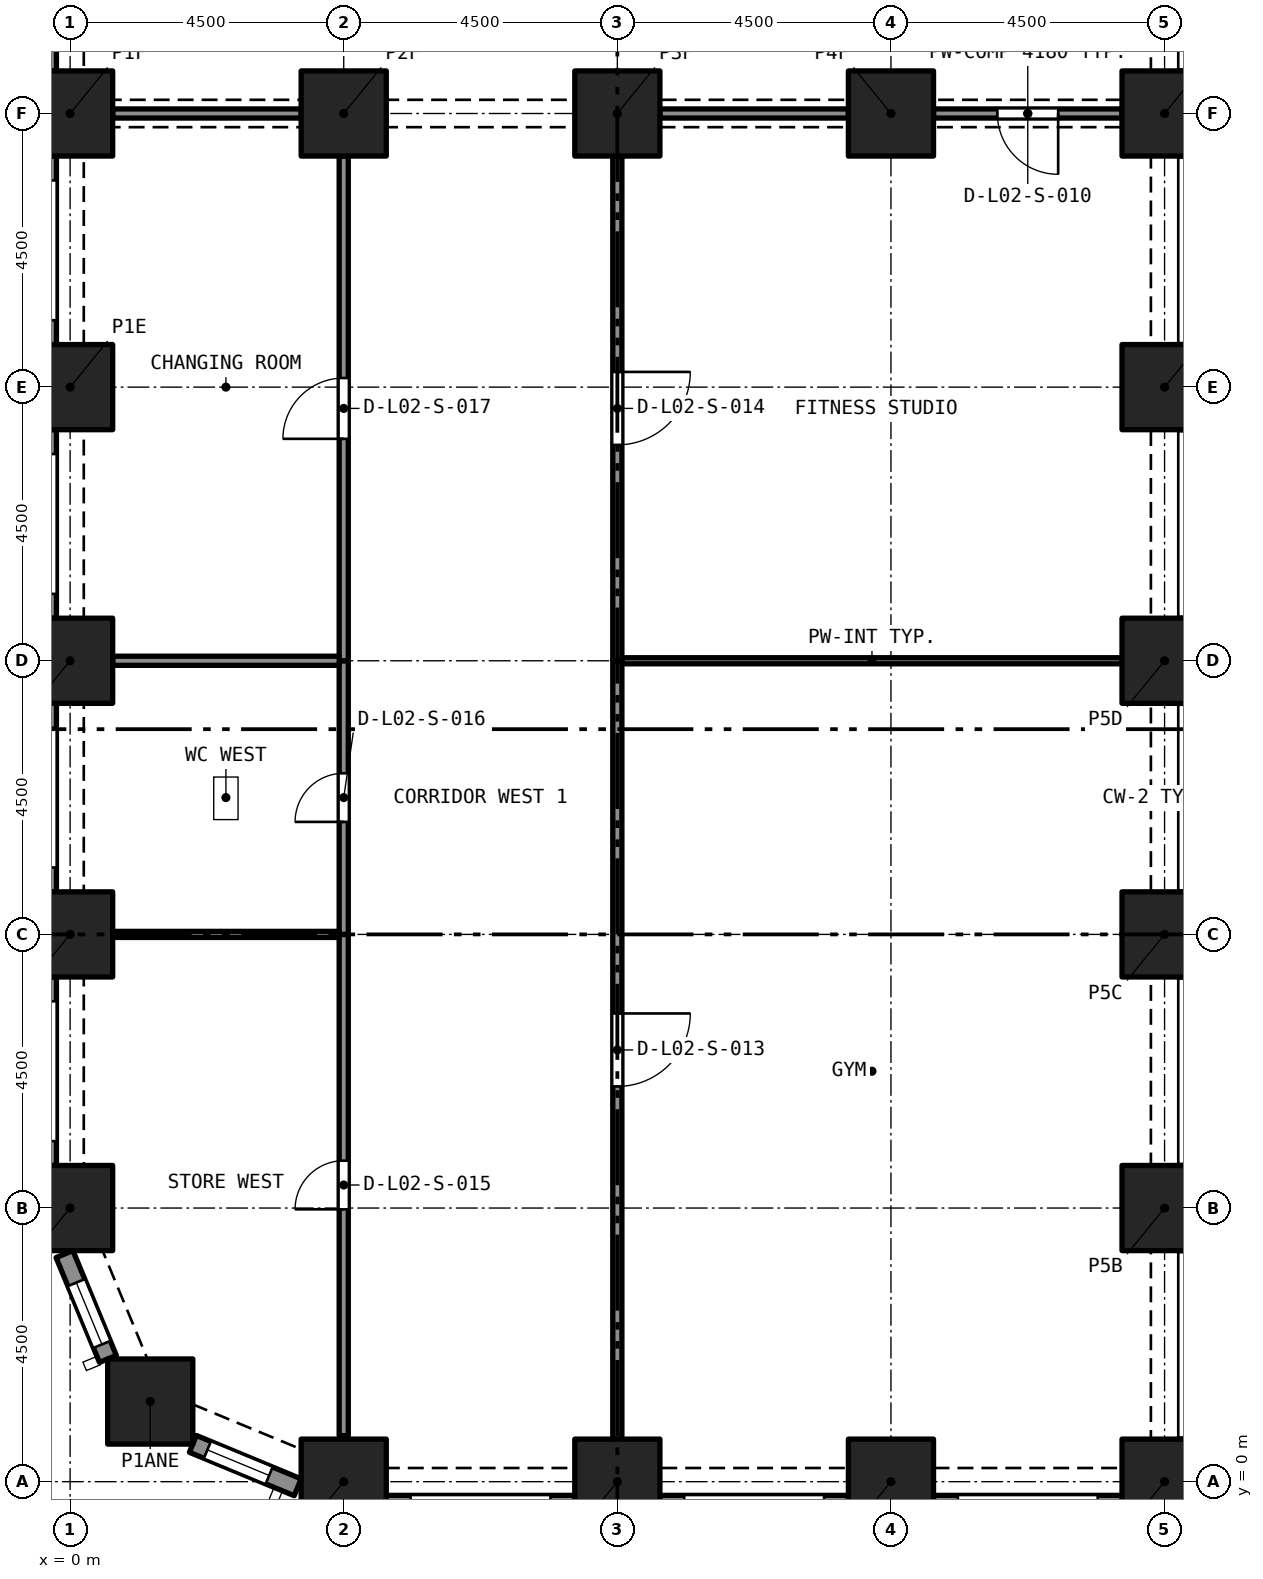
"""IFC4 building model, lengths in metres.
Left out: names, types, materials, properties, quantities, classifications, styles, units other than length and angle.
Written with IfcOpenShell. Run it as: python <this file> out.ifc"""

import sys

from ifc_helpers import new_model, si_unit, direction, frame, frame_2d, origin, origin_2d, place, context, subcontext, project, spatial, rectangle, extrude, element, fill, save


model = new_model("IFC4")
c1 = context("Model", 3, precision=1e-05, world=origin(), true_north=direction((0.0, 1.0)))
c2 = subcontext(c1, "Body", "Model", "MODEL_VIEW")
j1 = project(units=[si_unit("LENGTHUNIT", "METRE"), si_unit("PLANEANGLEUNIT", "RADIAN")], contexts=[c1])
p1 = place(None, origin())
s1 = spatial("IfcSite", under=j1, at=p1, CompositionType="ELEMENT")
p2 = place(p1, origin())
s2 = spatial("IfcBuilding", under=s1, at=p2, CompositionType="ELEMENT")
p3 = place(p2, frame((0.0, 0.0, 11.0)))
s3 = spatial("IfcBuildingStorey", under=s2, at=p3, CompositionType="ELEMENT", Elevation=11.0)
for number, where, z_axis, x_axis in (
    (1, (4.5, 0.0, 0.0), (0.0, 0.0, 1.0), (1.0, 0.0, 0.0)),
    (2, (9.0, 0.0, 0.0), (0.0, 0.0, 1.0), (1.0, 0.0, 0.0)),
    (3, (13.5, 0.0, 0.0), (0.0, 0.0, 1.0), (1.0, 0.0, 0.0)),
    (4, (18.0, 0.0, 0.0), (0.0, 0.0, 1.0), (1.0, 0.0, 0.0)),
    (5, (1.318, 1.318, 0.0), (0.0, 0.0, 1.0), (1.0, 0.0, 0.0)),
    (6, (0.0, 4.5, 0.0), (0.0, 0.0, 1.0), (1.0, 0.0, 0.0)),
    (7, (18.0, 4.5, 0.0), (0.0, 0.0, 1.0), (1.0, 0.0, 0.0)),
    (8, (0.0, 9.0, 0.0), (0.0, 0.0, 1.0), (1.0, 0.0, 0.0)),
    (9, (18.0, 9.0, 0.0), (0.0, 0.0, 1.0), (1.0, 0.0, 0.0)),
    (10, (0.0, 13.5, 0.0), (0.0, 0.0, 1.0), (1.0, 0.0, 0.0)),
    (11, (18.0, 13.5, 0.0), (0.0, 0.0, 1.0), (1.0, 0.0, 0.0)),
    (12, (0.0, 18.0, 0.0), (0.0, 0.0, 1.0), (1.0, 0.0, 0.0)),
    (13, (18.0, 18.0, 0.0), (0.0, 0.0, 1.0), (1.0, 0.0, 0.0)),
    (14, (0.0, 22.5, 0.0), (0.0, 0.0, 1.0), (1.0, 0.0, 0.0)),
    (15, (4.5, 22.5, 0.0), (0.0, 0.0, 1.0), (1.0, 0.0, 0.0)),
    (16, (9.0, 22.5, 0.0), (0.0, 0.0, 1.0), (1.0, 0.0, 0.0)),
    (17, (13.5, 22.5, 0.0), (0.0, 0.0, 1.0), (1.0, 0.0, 0.0)),
    (18, (18.0, 22.5, 0.0), (0.0, 0.0, 1.0), (1.0, 0.0, 0.0)),
):
    element("IfcColumn", number, at=place(p3, frame(where, z_axis=z_axis, x_axis=x_axis)), inside=s3, PredefinedType="COLUMN", context=c2, shape_type="SweptSolid", body=[
        extrude(rectangle(XDim=1.4, YDim=1.4, at=origin_2d()), origin(), (0.0, 0.0, 1.0), 5.0),
    ])
p4 = place(p3, frame((-0.375, 23.2, 0.0), z_axis=(0.0, 0.0, 1.0), x_axis=(0.0, 1.0, 0.0)))
e19 = element("IfcWall", 19, at=p4, inside=s3, PredefinedType="SOLIDWALL", context=c2, shape_type="SweptSolid", body=[
    extrude(rectangle(XDim=3.1, YDim=0.3, at=frame_2d((1.55, 0.0))), origin(), (0.0, 0.0, 1.0), 5.0),
])
p5 = place(p4, frame((0.4, 0.0, 0.45)))
e20 = element("IfcOpeningElement", 20, at=p5, cuts=e19, PredefinedType="OPENING", context=c2, shape_type="SweptSolid", body=[
    extrude(rectangle(XDim=2.3, YDim=3.3, at=frame_2d((1.15, 1.65))), frame((0.0, 0.16, 0.0), z_axis=(0.0, -1.0, 0.0), x_axis=(1.0, 0.0, 0.0)), (0.0, 0.0, 1.0), 0.32),
])
p6 = place(p3, frame((-0.375, 18.7, 0.0), z_axis=(0.0, 0.0, 1.0), x_axis=(0.0, 1.0, 0.0)))
e21 = element("IfcWall", 21, at=p6, inside=s3, PredefinedType="SOLIDWALL", context=c2, shape_type="SweptSolid", body=[
    extrude(rectangle(XDim=3.1, YDim=0.3, at=frame_2d((1.55, 0.0))), origin(), (0.0, 0.0, 1.0), 5.0),
])
p7 = place(p6, frame((0.4, 0.0, 0.45)))
e22 = element("IfcOpeningElement", 22, at=p7, cuts=e21, PredefinedType="OPENING", context=c2, shape_type="SweptSolid", body=[
    extrude(rectangle(XDim=2.3, YDim=3.3, at=frame_2d((1.15, 1.65))), frame((0.0, 0.16, 0.0), z_axis=(0.0, -1.0, 0.0), x_axis=(1.0, 0.0, 0.0)), (0.0, 0.0, 1.0), 0.32),
])
p8 = place(p3, frame((-0.375, 14.2, 0.0), z_axis=(0.0, 0.0, 1.0), x_axis=(0.0, 1.0, 0.0)))
e23 = element("IfcWall", 23, at=p8, inside=s3, PredefinedType="SOLIDWALL", context=c2, shape_type="SweptSolid", body=[
    extrude(rectangle(XDim=3.1, YDim=0.3, at=frame_2d((1.55, 0.0))), origin(), (0.0, 0.0, 1.0), 5.0),
])
p9 = place(p8, frame((0.4, 0.0, 0.45)))
e24 = element("IfcOpeningElement", 24, at=p9, cuts=e23, PredefinedType="OPENING", context=c2, shape_type="SweptSolid", body=[
    extrude(rectangle(XDim=2.3, YDim=3.3, at=frame_2d((1.15, 1.65))), frame((0.0, 0.16, 0.0), z_axis=(0.0, -1.0, 0.0), x_axis=(1.0, 0.0, 0.0)), (0.0, 0.0, 1.0), 0.32),
])
p10 = place(p3, frame((-0.375, 9.7, 0.0), z_axis=(0.0, 0.0, 1.0), x_axis=(0.0, 1.0, 0.0)))
e25 = element("IfcWall", 25, at=p10, inside=s3, PredefinedType="SOLIDWALL", context=c2, shape_type="SweptSolid", body=[
    extrude(rectangle(XDim=3.1, YDim=0.3, at=frame_2d((1.55, 0.0))), origin(), (0.0, 0.0, 1.0), 5.0),
])
p11 = place(p10, frame((0.4, 0.0, 0.45)))
e26 = element("IfcOpeningElement", 26, at=p11, cuts=e25, PredefinedType="OPENING", context=c2, shape_type="SweptSolid", body=[
    extrude(rectangle(XDim=2.3, YDim=3.3, at=frame_2d((1.15, 1.65))), frame((0.0, 0.16, 0.0), z_axis=(0.0, -1.0, 0.0), x_axis=(1.0, 0.0, 0.0)), (0.0, 0.0, 1.0), 0.32),
])
p12 = place(p3, frame((-0.375, 5.2, 0.0), z_axis=(0.0, 0.0, 1.0), x_axis=(0.0, 1.0, 0.0)))
e27 = element("IfcWall", 27, at=p12, inside=s3, PredefinedType="SOLIDWALL", context=c2, shape_type="SweptSolid", body=[
    extrude(rectangle(XDim=3.1, YDim=0.3, at=frame_2d((1.55, 0.0))), origin(), (0.0, 0.0, 1.0), 5.0),
])
p13 = place(p12, frame((0.4, 0.0, 0.45)))
e28 = element("IfcOpeningElement", 28, at=p13, cuts=e27, PredefinedType="OPENING", context=c2, shape_type="SweptSolid", body=[
    extrude(rectangle(XDim=2.3, YDim=3.3, at=frame_2d((1.15, 1.65))), frame((0.0, 0.16, 0.0), z_axis=(0.0, -1.0, 0.0), x_axis=(1.0, 0.0, 0.0)), (0.0, 0.0, 1.0), 0.32),
])
p14 = place(p3, frame((0.622, 2.02, 0.0), z_axis=(0.0, 0.0, 1.0), x_axis=(-0.38262540684, 0.923903565336, 0.0)))
e29 = element("IfcWall", 29, at=p14, inside=s3, PredefinedType="SOLIDWALL", context=c2, shape_type="SweptSolid", body=[
    extrude(rectangle(XDim=1.865, YDim=0.3, at=frame_2d((0.933, 0.0))), origin(), (0.0, 0.0, 1.0), 5.0),
])
p15 = place(p14, frame((0.258, 0.0, 0.45)))
e30 = element("IfcOpeningElement", 30, at=p15, cuts=e29, PredefinedType="OPENING", context=c2, shape_type="SweptSolid", body=[
    extrude(rectangle(XDim=1.1, YDim=3.3, at=frame_2d((0.55, 1.65))), frame((0.0, 0.16, 0.0), z_axis=(0.0, -1.0, 0.0), x_axis=(1.0, 0.0, 0.0)), (0.0, 0.0, 1.0), 0.32),
])
p16 = place(p3, frame((3.743, -0.092, 0.0), z_axis=(0.0, 0.0, 1.0), x_axis=(-0.923857286003, 0.382737135771, 0.0)))
e31 = element("IfcWall", 31, at=p16, inside=s3, PredefinedType="SOLIDWALL", context=c2, shape_type="SweptSolid", body=[
    extrude(rectangle(XDim=1.865, YDim=0.3, at=frame_2d((0.933, 0.0))), origin(), (0.0, 0.0, 1.0), 5.0),
])
p17 = place(p16, frame((0.508, 0.0, 0.45)))
e32 = element("IfcOpeningElement", 32, at=p17, cuts=e31, PredefinedType="OPENING", context=c2, shape_type="SweptSolid", body=[
    extrude(rectangle(XDim=1.1, YDim=3.3, at=frame_2d((0.55, 1.65))), frame((0.0, 0.16, 0.0), z_axis=(0.0, -1.0, 0.0), x_axis=(1.0, 0.0, 0.0)), (0.0, 0.0, 1.0), 0.32),
])
p18 = place(p3, frame((8.3, -0.375, 0.0), z_axis=(0.0, 0.0, 1.0), x_axis=(-1.0, 0.0, 0.0)))
e33 = element("IfcWall", 33, at=p18, inside=s3, PredefinedType="SOLIDWALL", context=c2, shape_type="SweptSolid", body=[
    extrude(rectangle(XDim=3.1, YDim=0.3, at=frame_2d((1.55, 0.0))), origin(), (0.0, 0.0, 1.0), 5.0),
])
p19 = place(p18, frame((0.4, 0.0, 0.45)))
e34 = element("IfcOpeningElement", 34, at=p19, cuts=e33, PredefinedType="OPENING", context=c2, shape_type="SweptSolid", body=[
    extrude(rectangle(XDim=2.3, YDim=3.3, at=frame_2d((1.15, 1.65))), frame((0.0, 0.16, 0.0), z_axis=(0.0, -1.0, 0.0), x_axis=(1.0, 0.0, 0.0)), (0.0, 0.0, 1.0), 0.32),
])
p20 = place(p3, frame((12.8, -0.375, 0.0), z_axis=(0.0, 0.0, 1.0), x_axis=(-1.0, 0.0, 0.0)))
e35 = element("IfcWall", 35, at=p20, inside=s3, PredefinedType="SOLIDWALL", context=c2, shape_type="SweptSolid", body=[
    extrude(rectangle(XDim=3.1, YDim=0.3, at=frame_2d((1.55, 0.0))), origin(), (0.0, 0.0, 1.0), 5.0),
])
p21 = place(p20, frame((0.4, 0.0, 0.45)))
e36 = element("IfcOpeningElement", 36, at=p21, cuts=e35, PredefinedType="OPENING", context=c2, shape_type="SweptSolid", body=[
    extrude(rectangle(XDim=2.3, YDim=3.3, at=frame_2d((1.15, 1.65))), frame((0.0, 0.16, 0.0), z_axis=(0.0, -1.0, 0.0), x_axis=(1.0, 0.0, 0.0)), (0.0, 0.0, 1.0), 0.32),
])
p22 = place(p3, frame((17.3, -0.375, 0.0), z_axis=(0.0, 0.0, 1.0), x_axis=(-1.0, 0.0, 0.0)))
e37 = element("IfcWall", 37, at=p22, inside=s3, PredefinedType="SOLIDWALL", context=c2, shape_type="SweptSolid", body=[
    extrude(rectangle(XDim=3.1, YDim=0.3, at=frame_2d((1.55, 0.0))), origin(), (0.0, 0.0, 1.0), 5.0),
])
p23 = place(p22, frame((0.4, 0.0, 0.45)))
e38 = element("IfcOpeningElement", 38, at=p23, cuts=e37, PredefinedType="OPENING", context=c2, shape_type="SweptSolid", body=[
    extrude(rectangle(XDim=2.3, YDim=3.3, at=frame_2d((1.15, 1.65))), frame((0.0, 0.16, 0.0), z_axis=(0.0, -1.0, 0.0), x_axis=(1.0, 0.0, 0.0)), (0.0, 0.0, 1.0), 0.32),
])
p24 = place(p3, frame((17.3, 22.5, 0.0), z_axis=(0.0, 0.0, 1.0), x_axis=(-1.0, 0.0, 0.0)))
e39 = element("IfcWall", 39, at=p24, inside=s3, PredefinedType="PARTITIONING", context=c2, shape_type="SweptSolid", body=[
    extrude(rectangle(XDim=3.1, YDim=0.15, at=frame_2d((1.55, 0.0))), origin(), (0.0, 0.0, 1.0), 4.18),
])
p25 = place(p24, frame((1.05, 0.0, 0.0)))
e40 = element("IfcOpeningElement", 40, at=p25, cuts=e39, PredefinedType="OPENING", context=c2, shape_type="SweptSolid", body=[
    extrude(rectangle(XDim=1.0, YDim=2.1, at=frame_2d((0.5, 1.05))), frame((0.0, 0.085, 0.0), z_axis=(0.0, -1.0, 0.0), x_axis=(1.0, 0.0, 0.0)), (0.0, 0.0, 1.0), 0.17),
])
for number, where, z_axis, x_axis in (
    (41, (9.7, 22.5, 0.0), (0.0, 0.0, 1.0), (1.0, 0.0, 0.0)),
    (42, (0.7, 22.5, 0.0), (0.0, 0.0, 1.0), (1.0, 0.0, 0.0)),
):
    element("IfcWall", number, at=place(p3, frame(where, z_axis=z_axis, x_axis=x_axis)), inside=s3, PredefinedType="PARTITIONING", context=c2, shape_type="SweptSolid", body=[
        extrude(rectangle(XDim=3.1, YDim=0.15, at=frame_2d((1.55, 0.0))), origin(), (0.0, 0.0, 1.0), 4.18),
    ])
p26 = place(p3, frame((9.075, 13.5, 0.0), z_axis=(0.0, 0.0, 1.0), x_axis=(1.0, 0.0, 0.0)))
e43 = element("IfcWall", 43, at=p26, inside=s3, PredefinedType="PARTITIONING", context=c2, shape_type="SweptSolid", body=[
    extrude(rectangle(XDim=8.225, YDim=0.1, at=frame_2d((4.113, 0.0))), origin(), (0.0, 0.0, 1.0), 4.65),
])
p27 = place(p3, frame((9.0, 13.5, 0.0), z_axis=(0.0, 0.0, 1.0), x_axis=(0.0, -1.0, 0.0)))
e44 = element("IfcWall", 44, at=p27, inside=s3, PredefinedType="PARTITIONING", context=c2, shape_type="SweptSolid", body=[
    extrude(rectangle(XDim=12.8, YDim=0.15, at=frame_2d((6.4, 0.0))), origin(), (0.0, 0.0, 1.0), 4.65),
])
p28 = place(p27, frame((5.8, 0.0, 0.0)))
e45 = element("IfcOpeningElement", 45, at=p28, cuts=e44, PredefinedType="OPENING", context=c2, shape_type="SweptSolid", body=[
    extrude(rectangle(XDim=1.2, YDim=2.1, at=frame_2d((0.6, 1.05))), frame((0.0, 0.085, 0.0), z_axis=(0.0, -1.0, 0.0), x_axis=(1.0, 0.0, 0.0)), (0.0, 0.0, 1.0), 0.17),
])
p29 = place(p3, frame((9.0, 21.8, 0.0), z_axis=(0.0, 0.0, 1.0), x_axis=(0.0, -1.0, 0.0)))
e46 = element("IfcWall", 46, at=p29, inside=s3, PredefinedType="PARTITIONING", context=c2, shape_type="SweptSolid", body=[
    extrude(rectangle(XDim=8.3, YDim=0.15, at=frame_2d((4.15, 0.0))), origin(), (0.0, 0.0, 1.0), 4.65),
])
p30 = place(p29, frame((3.55, 0.0, 0.0)))
e47 = element("IfcOpeningElement", 47, at=p30, cuts=e46, PredefinedType="OPENING", context=c2, shape_type="SweptSolid", body=[
    extrude(rectangle(XDim=1.2, YDim=2.1, at=frame_2d((0.6, 1.05))), frame((0.0, 0.085, 0.0), z_axis=(0.0, -1.0, 0.0), x_axis=(1.0, 0.0, 0.0)), (0.0, 0.0, 1.0), 0.17),
])
p31 = place(p3, frame((4.5, 0.758, 0.0), z_axis=(0.0, 0.0, 1.0), x_axis=(0.0, 1.0, 0.0)))
e48 = element("IfcWall", 48, at=p31, inside=s3, PredefinedType="PARTITIONING", context=c2, shape_type="SweptSolid", body=[
    extrude(rectangle(XDim=8.242, YDim=0.15, at=frame_2d((4.121, 0.0))), origin(), (0.0, 0.0, 1.0), 4.65),
])
p32 = place(p31, frame((3.721, 0.0, 0.0)))
e49 = element("IfcOpeningElement", 49, at=p32, cuts=e48, PredefinedType="OPENING", context=c2, shape_type="SweptSolid", body=[
    extrude(rectangle(XDim=0.8, YDim=2.1, at=frame_2d((0.4, 1.05))), frame((0.0, 0.085, 0.0), z_axis=(0.0, -1.0, 0.0), x_axis=(1.0, 0.0, 0.0)), (0.0, 0.0, 1.0), 0.17),
])
p33 = place(p3, frame((4.5, 9.0, 0.0), z_axis=(0.0, 0.0, 1.0), x_axis=(0.0, 1.0, 0.0)))
e50 = element("IfcWall", 50, at=p33, inside=s3, PredefinedType="PARTITIONING", context=c2, shape_type="SweptSolid", body=[
    extrude(rectangle(XDim=4.5, YDim=0.15, at=frame_2d((2.25, 0.0))), origin(), (0.0, 0.0, 1.0), 4.65),
])
p34 = place(p33, frame((1.85, 0.0, 0.0)))
e51 = element("IfcOpeningElement", 51, at=p34, cuts=e50, PredefinedType="OPENING", context=c2, shape_type="SweptSolid", body=[
    extrude(rectangle(XDim=0.8, YDim=2.1, at=frame_2d((0.4, 1.05))), frame((0.0, 0.085, 0.0), z_axis=(0.0, -1.0, 0.0), x_axis=(1.0, 0.0, 0.0)), (0.0, 0.0, 1.0), 0.17),
])
p35 = place(p3, frame((4.5, 13.5, 0.0), z_axis=(0.0, 0.0, 1.0), x_axis=(0.0, 1.0, 0.0)))
e52 = element("IfcWall", 52, at=p35, inside=s3, PredefinedType="PARTITIONING", context=c2, shape_type="SweptSolid", body=[
    extrude(rectangle(XDim=8.3, YDim=0.15, at=frame_2d((4.15, 0.0))), origin(), (0.0, 0.0, 1.0), 4.65),
])
p36 = place(p35, frame((3.65, 0.0, 0.0)))
e53 = element("IfcOpeningElement", 53, at=p36, cuts=e52, PredefinedType="OPENING", context=c2, shape_type="SweptSolid", body=[
    extrude(rectangle(XDim=1.0, YDim=2.1, at=frame_2d((0.5, 1.05))), frame((0.0, 0.085, 0.0), z_axis=(0.0, -1.0, 0.0), x_axis=(1.0, 0.0, 0.0)), (0.0, 0.0, 1.0), 0.17),
])
p37 = place(p3, frame((0.7, 9.0, 0.0), z_axis=(0.0, 0.0, 1.0), x_axis=(1.0, 0.0, 0.0)))
e54 = element("IfcWall", 54, at=p37, inside=s3, PredefinedType="PARTITIONING", context=c2, shape_type="SweptSolid", body=[
    extrude(rectangle(XDim=3.725, YDim=0.1, at=frame_2d((1.863, 0.0))), origin(), (0.0, 0.0, 1.0), 4.65),
])
p38 = place(p3, frame((0.7, 13.5, 0.0), z_axis=(0.0, 0.0, 1.0), x_axis=(1.0, 0.0, 0.0)))
e55 = element("IfcWall", 55, at=p38, inside=s3, PredefinedType="PARTITIONING", context=c2, shape_type="SweptSolid", body=[
    extrude(rectangle(XDim=3.725, YDim=0.15, at=frame_2d((1.863, 0.0))), origin(), (0.0, 0.0, 1.0), 4.65),
])
p39 = place(p15, origin())
e56 = element("IfcWindow", 56, at=p39, inside=s3, PartitioningType="SINGLE_PANEL", PredefinedType="WINDOW", context=c2, shape_type="SweptSolid", body=[
    extrude(rectangle(XDim=1.1, YDim=3.3, at=frame_2d((0.55, 1.65))), frame((0.0, 0.03, 0.0), z_axis=(0.0, -1.0, 0.0), x_axis=(1.0, 0.0, 0.0)), (0.0, 0.0, 1.0), 0.06),
])
fill(e30, e56)
p40 = place(p17, origin())
e57 = element("IfcWindow", 57, at=p40, inside=s3, PartitioningType="SINGLE_PANEL", PredefinedType="WINDOW", context=c2, shape_type="SweptSolid", body=[
    extrude(rectangle(XDim=1.1, YDim=3.3, at=frame_2d((0.55, 1.65))), frame((0.0, 0.03, 0.0), z_axis=(0.0, -1.0, 0.0), x_axis=(1.0, 0.0, 0.0)), (0.0, 0.0, 1.0), 0.06),
])
fill(e32, e57)
p41 = place(p25, origin())
e58 = element("IfcDoor", 58, at=p41, inside=s3, OperationType="SINGLE_SWING_RIGHT", PredefinedType="DOOR", context=c2, shape_type="SweptSolid", body=[
    extrude(rectangle(XDim=1.0, YDim=2.1, at=frame_2d((0.5, 1.05))), frame((0.0, 0.025, 0.0), z_axis=(0.0, -1.0, 0.0), x_axis=(1.0, 0.0, 0.0)), (0.0, 0.0, 1.0), 0.05),
])
fill(e40, e58)
p42 = place(p28, origin())
e59 = element("IfcDoor", 59, at=p42, inside=s3, OperationType="SINGLE_SWING_RIGHT", PredefinedType="DOOR", context=c2, shape_type="SweptSolid", body=[
    extrude(rectangle(XDim=1.2, YDim=2.1, at=frame_2d((0.6, 1.05))), frame((0.0, 0.025, 0.0), z_axis=(0.0, -1.0, 0.0), x_axis=(1.0, 0.0, 0.0)), (0.0, 0.0, 1.0), 0.05),
])
fill(e45, e59)
p43 = place(p30, origin())
e60 = element("IfcDoor", 60, at=p43, inside=s3, OperationType="SINGLE_SWING_RIGHT", PredefinedType="DOOR", context=c2, shape_type="SweptSolid", body=[
    extrude(rectangle(XDim=1.2, YDim=2.1, at=frame_2d((0.6, 1.05))), frame((0.0, 0.025, 0.0), z_axis=(0.0, -1.0, 0.0), x_axis=(1.0, 0.0, 0.0)), (0.0, 0.0, 1.0), 0.05),
])
fill(e47, e60)
p44 = place(p32, origin())
e61 = element("IfcDoor", 61, at=p44, inside=s3, OperationType="SINGLE_SWING_RIGHT", PredefinedType="DOOR", context=c2, shape_type="SweptSolid", body=[
    extrude(rectangle(XDim=0.8, YDim=2.1, at=frame_2d((0.4, 1.05))), frame((0.0, 0.025, 0.0), z_axis=(0.0, -1.0, 0.0), x_axis=(1.0, 0.0, 0.0)), (0.0, 0.0, 1.0), 0.05),
])
fill(e49, e61)
p45 = place(p34, origin())
e62 = element("IfcDoor", 62, at=p45, inside=s3, OperationType="SINGLE_SWING_RIGHT", PredefinedType="DOOR", context=c2, shape_type="SweptSolid", body=[
    extrude(rectangle(XDim=0.8, YDim=2.1, at=frame_2d((0.4, 1.05))), frame((0.0, 0.025, 0.0), z_axis=(0.0, -1.0, 0.0), x_axis=(1.0, 0.0, 0.0)), (0.0, 0.0, 1.0), 0.05),
])
fill(e51, e62)
p46 = place(p36, origin())
e63 = element("IfcDoor", 63, at=p46, inside=s3, OperationType="SINGLE_SWING_RIGHT", PredefinedType="DOOR", context=c2, shape_type="SweptSolid", body=[
    extrude(rectangle(XDim=1.0, YDim=2.1, at=frame_2d((0.5, 1.05))), frame((0.0, 0.025, 0.0), z_axis=(0.0, -1.0, 0.0), x_axis=(1.0, 0.0, 0.0)), (0.0, 0.0, 1.0), 0.05),
])
fill(e53, e63)
save(model, sys.argv[1])
